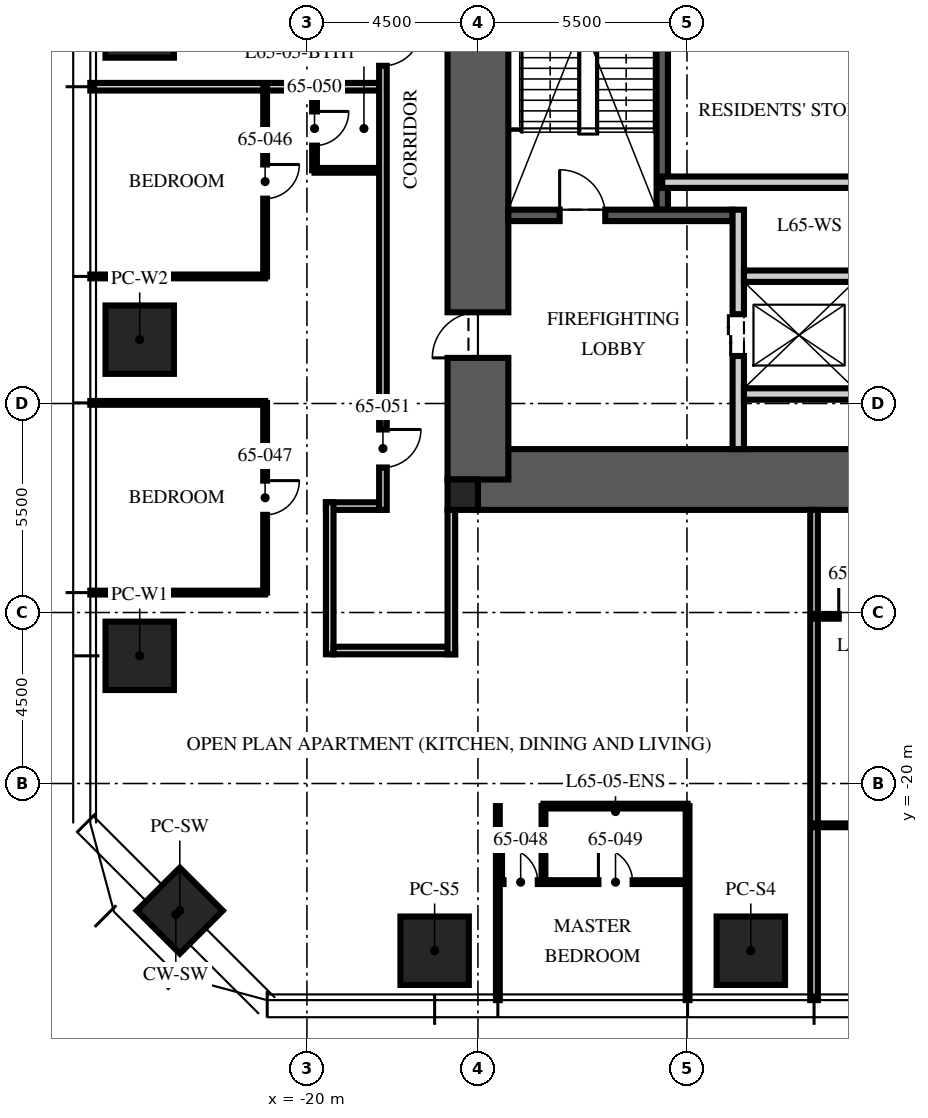
"""IFC4 building model, lengths in metres.
Left out: names, types, materials, properties, quantities, classifications, styles, units other than length and angle.
Written with IfcOpenShell. Run it as: python <this file> out.ifc"""

import sys

from ifc_helpers import new_model, si_unit, direction, frame, frame_2d, origin, origin_2d, place, context, subcontext, project, spatial, rectangle, extrude, element, fill, save


model = new_model("IFC4")
c1 = context("Model", 3, precision=1e-05, world=origin(), true_north=direction((0.0, 1.0)))
c2 = subcontext(c1, "Body", "Model", "MODEL_VIEW")
j1 = project(units=[si_unit("LENGTHUNIT", "METRE"), si_unit("PLANEANGLEUNIT", "RADIAN")], contexts=[c1])
p1 = place(None, origin())
s1 = spatial("IfcSite", under=j1, at=p1, CompositionType="ELEMENT")
p2 = place(p1, origin())
s2 = spatial("IfcBuilding", under=s1, at=p2, CompositionType="ELEMENT")
p3 = place(p2, frame((0.0, 0.0, 259.5)))
s3 = spatial("IfcBuildingStorey", under=s2, at=p3, CompositionType="ELEMENT", Elevation=259.5)
p4 = place(p3, frame((-15.5, -12.0, -0.25), z_axis=(0.0, 0.0, 1.0), x_axis=(1.0, 0.0, 0.0)))
e1 = element("IfcWall", 1, at=p4, inside=s3, PredefinedType="SHEAR", context=c2, shape_type="SweptSolid", body=[
    extrude(rectangle(XDim=31.0, YDim=1.6, at=frame_2d((15.5, 0.0))), origin(), (0.0, 0.0, 1.0), 3.75),
])
p5 = place(p3, frame((-15.5, -12.0, -0.25), z_axis=(0.0, 0.0, 1.0), x_axis=(0.0, 1.0, 0.0)))
e2 = element("IfcWall", 2, at=p5, inside=s3, PredefinedType="SHEAR", context=c2, shape_type="SweptSolid", body=[
    extrude(rectangle(XDim=24.0, YDim=1.6, at=frame_2d((12.0, 0.0))), origin(), (0.0, 0.0, 1.0), 3.75),
])
p6 = place(p5, frame((3.2, 0.0, 0.25)))
e3 = element("IfcOpeningElement", 3, at=p6, cuts=e2, PredefinedType="OPENING", context=c2, shape_type="SweptSolid", body=[
    extrude(rectangle(XDim=1.2, YDim=2.1, at=frame_2d((0.6, 1.05))), frame((0.0, 0.81, 0.0), z_axis=(0.0, -1.0, 0.0), x_axis=(1.0, 0.0, 0.0)), (0.0, 0.0, 1.0), 1.62),
])
p7 = place(p5, frame((19.3, 0.0, 0.25)))
e4 = element("IfcOpeningElement", 4, at=p7, cuts=e2, PredefinedType="OPENING", context=c2, shape_type="SweptSolid", body=[
    extrude(rectangle(XDim=1.8, YDim=2.1, at=frame_2d((0.9, 1.05))), frame((0.0, 0.81, 0.0), z_axis=(0.0, -1.0, 0.0), x_axis=(1.0, 0.0, 0.0)), (0.0, 0.0, 1.0), 1.62),
])
p8 = place(p3, frame((-15.9, -12.4, -0.25), z_axis=(0.0, 0.0, 1.0), x_axis=(1.0, 0.0, 0.0)))
e5 = element("IfcColumn", 5, at=p8, inside=s3, PredefinedType="COLUMN", context=c2, shape_type="SweptSolid", body=[
    extrude(rectangle(XDim=0.8, YDim=0.8, at=origin_2d()), origin(), (0.0, 0.0, 1.0), 3.75),
])
for number, where, z_axis, x_axis in (
    (6, (-8.32, -24.4, 0.0), (0.0, 0.0, 1.0), (1.0, 0.0, 0.0)),
    (7, (-16.64, -24.4, 0.0), (0.0, 0.0, 1.0), (1.0, 0.0, 0.0)),
    (8, (-24.4, -16.64, 0.0), (0.0, 0.0, 1.0), (0.0, 1.0, 0.0)),
    (9, (-24.4, -8.32, 0.0), (0.0, 0.0, 1.0), (0.0, 1.0, 0.0)),
    (10, (-24.4, 0.0, 0.0), (0.0, 0.0, 1.0), (0.0, 1.0, 0.0)),
):
    element("IfcColumn", number, at=place(p3, frame(where, z_axis=z_axis, x_axis=x_axis)), inside=s3, PredefinedType="COLUMN", context=c2, shape_type="SweptSolid", body=[
        extrude(rectangle(XDim=1.8, YDim=1.8, at=origin_2d()), origin(), (0.0, 0.0, 1.0), 3.75),
    ])
p9 = place(p3, frame((-23.346, -23.346, 0.0), z_axis=(0.0, 0.0, 1.0), x_axis=(0.707106781187, -0.707106781187, 0.0)))
e11 = element("IfcColumn", 11, at=p9, inside=s3, PredefinedType="COLUMN", context=c2, shape_type="SweptSolid", body=[
    extrude(rectangle(XDim=1.6, YDim=1.6, at=origin_2d()), origin(), (0.0, 0.0, 1.0), 3.75),
])
p10 = place(p3, frame((-10.65, -4.9, 0.0), z_axis=(0.0, 0.0, 1.0), x_axis=(0.0, 1.0, 0.0)))
e12 = element("IfcWall", 12, at=p10, inside=s3, PredefinedType="SOLIDWALL", context=c2, shape_type="SweptSolid", body=[
    extrude(rectangle(XDim=10.1, YDim=0.3, at=frame_2d((5.05, 0.0))), origin(), (0.0, 0.0, 1.0), 3.5),
])
p11 = place(p3, frame((-14.7, -5.05, 0.0), z_axis=(0.0, 0.0, 1.0), x_axis=(1.0, 0.0, 0.0)))
e13 = element("IfcWall", 13, at=p11, inside=s3, PredefinedType="SOLIDWALL", context=c2, shape_type="SweptSolid", body=[
    extrude(rectangle(XDim=5.9, YDim=0.3, at=frame_2d((2.95, 0.0))), origin(), (0.0, 0.0, 1.0), 3.5),
])
p12 = place(p11, frame((1.35, 0.0, 0.0)))
e14 = element("IfcOpeningElement", 14, at=p12, cuts=e13, PredefinedType="OPENING", context=c2, shape_type="SweptSolid", body=[
    extrude(rectangle(XDim=1.2, YDim=2.1, at=frame_2d((0.6, 1.05))), frame((0.0, 0.16, 0.0), z_axis=(0.0, -1.0, 0.0), x_axis=(1.0, 0.0, 0.0)), (0.0, 0.0, 1.0), 0.32),
])
p13 = place(p3, frame((-8.65, -11.2, 0.0), z_axis=(0.0, 0.0, 1.0), x_axis=(0.0, 1.0, 0.0)))
e15 = element("IfcWall", 15, at=p13, inside=s3, PredefinedType="PARTITIONING", context=c2, shape_type="SweptSolid", body=[
    extrude(rectangle(XDim=6.3, YDim=0.3, at=frame_2d((3.15, 0.0))), origin(), (0.0, 0.0, 1.0), 3.5),
])
p14 = place(p13, frame((2.45, 0.0, 0.0)))
e16 = element("IfcOpeningElement", 16, at=p14, cuts=e15, PredefinedType="OPENING", context=c2, shape_type="SweptSolid", body=[
    extrude(rectangle(XDim=1.1, YDim=2.1, at=frame_2d((0.55, 1.05))), frame((0.0, 0.16, 0.0), z_axis=(0.0, -1.0, 0.0), x_axis=(1.0, 0.0, 0.0)), (0.0, 0.0, 1.0), 0.32),
])
p15 = place(p3, frame((-8.5, -6.65, 0.0), z_axis=(0.0, 0.0, 1.0), x_axis=(1.0, 0.0, 0.0)))
e17 = element("IfcWall", 17, at=p15, inside=s3, PredefinedType="PARTITIONING", context=c2, shape_type="SweptSolid", body=[
    extrude(rectangle(XDim=17.0, YDim=0.3, at=frame_2d((8.5, 0.0))), origin(), (0.0, 0.0, 1.0), 3.5),
])
p16 = place(p15, frame((7.8, 0.0, 0.0)))
e18 = element("IfcOpeningElement", 18, at=p16, cuts=e17, PredefinedType="OPENING", context=c2, shape_type="SweptSolid", body=[
    extrude(rectangle(XDim=1.3, YDim=2.4, at=frame_2d((0.65, 1.2))), frame((0.0, 0.16, 0.0), z_axis=(0.0, -1.0, 0.0), x_axis=(1.0, 0.0, 0.0)), (0.0, 0.0, 1.0), 0.32),
])
p17 = place(p15, frame((5.65, 0.0, 0.0)))
e19 = element("IfcOpeningElement", 19, at=p17, cuts=e17, PredefinedType="OPENING", context=c2, shape_type="SweptSolid", body=[
    extrude(rectangle(XDim=0.9, YDim=2.1, at=frame_2d((0.45, 1.05))), frame((0.0, 0.16, 0.0), z_axis=(0.0, -1.0, 0.0), x_axis=(1.0, 0.0, 0.0)), (0.0, 0.0, 1.0), 0.32),
])
p18 = place(p15, frame((10.4, 0.0, 0.0)))
e20 = element("IfcOpeningElement", 20, at=p18, cuts=e17, PredefinedType="OPENING", context=c2, shape_type="SweptSolid", body=[
    extrude(rectangle(XDim=0.9, YDim=2.1, at=frame_2d((0.45, 1.05))), frame((0.0, 0.16, 0.0), z_axis=(0.0, -1.0, 0.0), x_axis=(1.0, 0.0, 0.0)), (0.0, 0.0, 1.0), 0.32),
])
p19 = place(p3, frame((-8.5, -9.75, 0.0), z_axis=(0.0, 0.0, 1.0), x_axis=(1.0, 0.0, 0.0)))
e21 = element("IfcWall", 21, at=p19, inside=s3, PredefinedType="PARTITIONING", context=c2, shape_type="SweptSolid", body=[
    extrude(rectangle(XDim=2.9, YDim=0.3, at=frame_2d((1.45, 0.0))), origin(), (0.0, 0.0, 1.0), 3.5),
])
p20 = place(p3, frame((-10.65, -4.177, 0.0), z_axis=(0.0, 0.0, 1.0), x_axis=(1.0, 0.0, 0.0)))
e22 = element("IfcWall", 22, at=p20, inside=s3, PredefinedType="PARTITIONING", context=c2, shape_type="SweptSolid", body=[
    extrude(rectangle(XDim=6.45, YDim=0.3, at=frame_2d((3.225, 0.0))), origin(), (0.0, 0.0, 1.0), 3.5),
])
p21 = place(p3, frame((-18.1, -12.7, 0.0), z_axis=(0.0, 0.0, 1.0), x_axis=(-1.0, 0.0, 0.0)))
e23 = element("IfcWall", 23, at=p21, inside=s3, PredefinedType="PARTITIONING", context=c2, shape_type="SweptSolid", body=[
    extrude(rectangle(XDim=1.4, YDim=0.2, at=frame_2d((0.7, 0.0))), origin(), (0.0, 0.0, 1.0), 2.81),
])
p22 = place(p3, frame((-19.4, -12.6, 0.0), z_axis=(0.0, 0.0, 1.0), x_axis=(0.0, -1.0, 0.0)))
e24 = element("IfcWall", 24, at=p22, inside=s3, PredefinedType="PARTITIONING", context=c2, shape_type="SweptSolid", body=[
    extrude(rectangle(XDim=4.0, YDim=0.2, at=frame_2d((2.0, 0.0))), origin(), (0.0, 0.0, 1.0), 2.6),
])
p23 = place(p3, frame((-19.3, -16.5, 0.0), z_axis=(0.0, 0.0, 1.0), x_axis=(1.0, 0.0, 0.0)))
e25 = element("IfcWall", 25, at=p23, inside=s3, PredefinedType="PARTITIONING", context=c2, shape_type="SweptSolid", body=[
    extrude(rectangle(XDim=3.2, YDim=0.2, at=frame_2d((1.6, 0.0))), origin(), (0.0, 0.0, 1.0), 2.3),
])
p24 = place(p3, frame((-16.2, -16.6, 0.0), z_axis=(0.0, 0.0, 1.0), x_axis=(0.0, 1.0, 0.0)))
e26 = element("IfcWall", 26, at=p24, inside=s3, PredefinedType="PARTITIONING", context=c2, shape_type="SweptSolid", body=[
    extrude(rectangle(XDim=3.8, YDim=0.2, at=frame_2d((1.9, 0.0))), origin(), (0.0, 0.0, 1.0), 2.3),
])
p25 = place(p3, frame((-18.1, -1.664, 0.0), z_axis=(0.0, 0.0, 1.0), x_axis=(-1.0, 0.0, 0.0)))
e27 = element("IfcWall", 27, at=p25, inside=s3, PredefinedType="PARTITIONING", context=c2, shape_type="SweptSolid", body=[
    extrude(rectangle(XDim=7.6, YDim=0.2, at=frame_2d((3.8, 0.0))), origin(), (0.0, 0.0, 1.0), 2.91),
])
for number, where, z_axis, x_axis in (
    (28, (-21.1, -6.656, 0.0), (0.0, 0.0, 1.0), (-1.0, 0.0, 0.0)),
    (29, (-21.1, -9.984, 0.0), (0.0, 0.0, 1.0), (-1.0, 0.0, 0.0)),
    (30, (-21.1, -14.976, 0.0), (0.0, 0.0, 1.0), (-1.0, 0.0, 0.0)),
):
    element("IfcWall", number, at=place(p3, frame(where, z_axis=z_axis, x_axis=x_axis)), inside=s3, PredefinedType="PARTITIONING", context=c2, shape_type="SweptSolid", body=[
        extrude(rectangle(XDim=4.6, YDim=0.1, at=frame_2d((2.3, 0.0))), origin(), (0.0, 0.0, 1.0), 2.91),
    ])
for number, where, z_axis, x_axis in (
    (31, (-14.976, -20.595, 0.0), (0.0, 0.0, 1.0), (0.0, -1.0, 0.0)),
    (32, (-9.984, -20.595, 0.0), (0.0, 0.0, 1.0), (0.0, -1.0, 0.0)),
):
    element("IfcWall", number, at=place(p3, frame(where, z_axis=z_axis, x_axis=x_axis)), inside=s3, PredefinedType="PARTITIONING", context=c2, shape_type="SweptSolid", body=[
        extrude(rectangle(XDim=5.105, YDim=0.1, at=frame_2d((2.552, 0.0))), origin(), (0.0, 0.0, 1.0), 2.91),
    ])
p26 = place(p3, frame((-6.656, -12.8, 0.0), z_axis=(0.0, 0.0, 1.0), x_axis=(0.0, -1.0, 0.0)))
e33 = element("IfcWall", 33, at=p26, inside=s3, PredefinedType="PARTITIONING", context=c2, shape_type="SweptSolid", body=[
    extrude(rectangle(XDim=12.9, YDim=0.2, at=frame_2d((6.45, 0.0))), origin(), (0.0, 0.0, 1.0), 2.91),
])
p27 = place(p3, frame((-21.1, -1.664, 0.0), z_axis=(0.0, 0.0, 1.0), x_axis=(0.0, -1.0, 0.0)))
e34 = element("IfcWall", 34, at=p27, inside=s3, PredefinedType="PARTITIONING", context=c2, shape_type="SweptSolid", body=[
    extrude(rectangle(XDim=4.992, YDim=0.1, at=frame_2d((2.496, 0.0))), origin(), (0.0, 0.0, 1.0), 2.81),
])
p28 = place(p27, frame((2.046, 0.0, 0.0)))
e35 = element("IfcOpeningElement", 35, at=p28, cuts=e34, PredefinedType="OPENING", context=c2, shape_type="SweptSolid", body=[
    extrude(rectangle(XDim=0.9, YDim=2.1, at=frame_2d((0.45, 1.05))), frame((0.0, 0.06, 0.0), z_axis=(0.0, -1.0, 0.0), x_axis=(1.0, 0.0, 0.0)), (0.0, 0.0, 1.0), 0.12),
])
p29 = place(p3, frame((-21.1, -9.984, 0.0), z_axis=(0.0, 0.0, 1.0), x_axis=(0.0, -1.0, 0.0)))
e36 = element("IfcWall", 36, at=p29, inside=s3, PredefinedType="PARTITIONING", context=c2, shape_type="SweptSolid", body=[
    extrude(rectangle(XDim=4.992, YDim=0.1, at=frame_2d((2.496, 0.0))), origin(), (0.0, 0.0, 1.0), 2.81),
])
p30 = place(p29, frame((2.046, 0.0, 0.0)))
e37 = element("IfcOpeningElement", 37, at=p30, cuts=e36, PredefinedType="OPENING", context=c2, shape_type="SweptSolid", body=[
    extrude(rectangle(XDim=0.9, YDim=2.1, at=frame_2d((0.45, 1.05))), frame((0.0, 0.06, 0.0), z_axis=(0.0, -1.0, 0.0), x_axis=(1.0, 0.0, 0.0)), (0.0, 0.0, 1.0), 0.12),
])
p31 = place(p3, frame((-14.976, -22.595, 0.0), z_axis=(0.0, 0.0, 1.0), x_axis=(1.0, 0.0, 0.0)))
e38 = element("IfcWall", 38, at=p31, inside=s3, PredefinedType="PARTITIONING", context=c2, shape_type="SweptSolid", body=[
    extrude(rectangle(XDim=4.992, YDim=0.1, at=frame_2d((2.496, 0.0))), origin(), (0.0, 0.0, 1.0), 2.81),
])
p32 = place(p31, frame((0.15, 0.0, 0.0)))
e39 = element("IfcOpeningElement", 39, at=p32, cuts=e38, PredefinedType="OPENING", context=c2, shape_type="SweptSolid", body=[
    extrude(rectangle(XDim=0.9, YDim=2.1, at=frame_2d((0.45, 1.05))), frame((0.0, 0.06, 0.0), z_axis=(0.0, -1.0, 0.0), x_axis=(1.0, 0.0, 0.0)), (0.0, 0.0, 1.0), 0.12),
])
p33 = place(p31, frame((2.646, 0.0, 0.0)))
e40 = element("IfcOpeningElement", 40, at=p33, cuts=e38, PredefinedType="OPENING", context=c2, shape_type="SweptSolid", body=[
    extrude(rectangle(XDim=0.9, YDim=2.1, at=frame_2d((0.45, 1.05))), frame((0.0, 0.06, 0.0), z_axis=(0.0, -1.0, 0.0), x_axis=(1.0, 0.0, 0.0)), (0.0, 0.0, 1.0), 0.12),
])
p34 = place(p3, frame((-13.776, -20.595, 0.0), z_axis=(0.0, 0.0, 1.0), x_axis=(0.0, -1.0, 0.0)))
e41 = element("IfcWall", 41, at=p34, inside=s3, PredefinedType="PARTITIONING", context=c2, shape_type="SweptSolid", body=[
    extrude(rectangle(XDim=2.0, YDim=0.1, at=frame_2d((1.0, 0.0))), origin(), (0.0, 0.0, 1.0), 3.5),
])
p35 = place(p3, frame((-13.776, -20.595, 0.0), z_axis=(0.0, 0.0, 1.0), x_axis=(1.0, 0.0, 0.0)))
e42 = element("IfcWall", 42, at=p35, inside=s3, PredefinedType="PARTITIONING", context=c2, shape_type="SweptSolid", body=[
    extrude(rectangle(XDim=3.792, YDim=0.125, at=frame_2d((1.896, 0.0))), origin(), (0.0, 0.0, 1.0), 2.81),
])
p36 = place(p3, frame((-19.8, -1.664, 0.0), z_axis=(0.0, 0.0, 1.0), x_axis=(0.0, -1.0, 0.0)))
e43 = element("IfcWall", 43, at=p36, inside=s3, PredefinedType="PARTITIONING", context=c2, shape_type="SweptSolid", body=[
    extrude(rectangle(XDim=2.2, YDim=0.125, at=frame_2d((1.1, 0.0))), origin(), (0.0, 0.0, 1.0), 3.5),
])
p37 = place(p36, frame((0.65, 0.0, 0.0)))
e44 = element("IfcOpeningElement", 44, at=p37, cuts=e43, PredefinedType="OPENING", context=c2, shape_type="SweptSolid", body=[
    extrude(rectangle(XDim=0.9, YDim=2.1, at=frame_2d((0.45, 1.05))), frame((0.0, 0.073, 0.0), z_axis=(0.0, -1.0, 0.0), x_axis=(1.0, 0.0, 0.0)), (0.0, 0.0, 1.0), 0.145),
])
p38 = place(p3, frame((-18.1, -3.864, 0.0), z_axis=(0.0, 0.0, 1.0), x_axis=(-1.0, 0.0, 0.0)))
e45 = element("IfcWall", 45, at=p38, inside=s3, PredefinedType="PARTITIONING", context=c2, shape_type="SweptSolid", body=[
    extrude(rectangle(XDim=1.7, YDim=0.125, at=frame_2d((0.85, 0.0))), origin(), (0.0, 0.0, 1.0), 3.5),
])
p39 = place(p3, frame((-6.656, -21.1, 0.0), z_axis=(0.0, 0.0, 1.0), x_axis=(1.0, 0.0, 0.0)))
e46 = element("IfcWall", 46, at=p39, inside=s3, PredefinedType="PARTITIONING", context=c2, shape_type="SweptSolid", body=[
    extrude(rectangle(XDim=4.992, YDim=0.1, at=frame_2d((2.496, 0.0))), origin(), (0.0, 0.0, 1.0), 2.81),
])
p40 = place(p39, frame((2.046, 0.0, 0.0)))
e47 = element("IfcOpeningElement", 47, at=p40, cuts=e46, PredefinedType="OPENING", context=c2, shape_type="SweptSolid", body=[
    extrude(rectangle(XDim=0.9, YDim=2.1, at=frame_2d((0.45, 1.05))), frame((0.0, 0.06, 0.0), z_axis=(0.0, -1.0, 0.0), x_axis=(1.0, 0.0, 0.0)), (0.0, 0.0, 1.0), 0.12),
])
p41 = place(p3, frame((-6.656, -15.6, 0.0), z_axis=(0.0, 0.0, 1.0), x_axis=(1.0, 0.0, 0.0)))
e48 = element("IfcWall", 48, at=p41, inside=s3, PredefinedType="PARTITIONING", context=c2, shape_type="SweptSolid", body=[
    extrude(rectangle(XDim=6.2, YDim=0.125, at=frame_2d((3.1, 0.0))), origin(), (0.0, 0.0, 1.0), 2.81),
])
p42 = place(p41, frame((0.65, 0.0, 0.0)))
e49 = element("IfcOpeningElement", 49, at=p42, cuts=e48, PredefinedType="OPENING", context=c2, shape_type="SweptSolid", body=[
    extrude(rectangle(XDim=0.9, YDim=2.1, at=frame_2d((0.45, 1.05))), frame((0.0, 0.073, 0.0), z_axis=(0.0, -1.0, 0.0), x_axis=(1.0, 0.0, 0.0)), (0.0, 0.0, 1.0), 0.145),
])
p43 = place(p41, frame((2.85, 0.0, 0.0)))
e50 = element("IfcOpeningElement", 50, at=p43, cuts=e48, PredefinedType="OPENING", context=c2, shape_type="SweptSolid", body=[
    extrude(rectangle(XDim=0.9, YDim=2.1, at=frame_2d((0.45, 1.05))), frame((0.0, 0.073, 0.0), z_axis=(0.0, -1.0, 0.0), x_axis=(1.0, 0.0, 0.0)), (0.0, 0.0, 1.0), 0.145),
])
p44 = place(p41, frame((4.85, 0.0, 0.0)))
e51 = element("IfcOpeningElement", 51, at=p44, cuts=e48, PredefinedType="OPENING", context=c2, shape_type="SweptSolid", body=[
    extrude(rectangle(XDim=0.9, YDim=2.1, at=frame_2d((0.45, 1.05))), frame((0.0, 0.073, 0.0), z_axis=(0.0, -1.0, 0.0), x_axis=(1.0, 0.0, 0.0)), (0.0, 0.0, 1.0), 0.145),
])
p45 = place(p3, frame((-18.0, 13.0, 0.0), z_axis=(0.0, 0.0, 1.0), x_axis=(0.0, -1.0, 0.0)))
e52 = element("IfcWall", 52, at=p45, inside=s3, PredefinedType="PARTITIONING", context=c2, shape_type="SweptSolid", body=[
    extrude(rectangle(XDim=25.8, YDim=0.2, at=frame_2d((12.9, 0.0))), origin(), (0.0, 0.0, 1.0), 2.6),
])
p46 = place(p45, frame((4.6, 0.0, 0.0)))
e53 = element("IfcOpeningElement", 53, at=p46, cuts=e52, PredefinedType="OPENING", context=c2, shape_type="SweptSolid", body=[
    extrude(rectangle(XDim=1.0, YDim=2.2, at=frame_2d((0.5, 1.1))), frame((0.0, 0.11, 0.0), z_axis=(0.0, -1.0, 0.0), x_axis=(1.0, 0.0, 0.0)), (0.0, 0.0, 1.0), 0.22),
])
p47 = place(p45, frame((13.114, 0.0, 0.0)))
e54 = element("IfcOpeningElement", 54, at=p47, cuts=e52, PredefinedType="OPENING", context=c2, shape_type="SweptSolid", body=[
    extrude(rectangle(XDim=1.0, YDim=2.2, at=frame_2d((0.5, 1.1))), frame((0.0, 0.11, 0.0), z_axis=(0.0, -1.0, 0.0), x_axis=(1.0, 0.0, 0.0)), (0.0, 0.0, 1.0), 0.22),
])
p48 = place(p45, frame((23.684, 0.0, 0.0)))
e55 = element("IfcOpeningElement", 55, at=p48, cuts=e52, PredefinedType="OPENING", context=c2, shape_type="SweptSolid", body=[
    extrude(rectangle(XDim=1.0, YDim=2.2, at=frame_2d((0.5, 1.1))), frame((0.0, 0.11, 0.0), z_axis=(0.0, -1.0, 0.0), x_axis=(1.0, 0.0, 0.0)), (0.0, 0.0, 1.0), 0.22),
])
p49 = place(p12, origin())
e56 = element("IfcDoor", 56, at=p49, inside=s3, OperationType="SINGLE_SWING_LEFT", PredefinedType="DOOR", context=c2, shape_type="SweptSolid", body=[
    extrude(rectangle(XDim=1.2, YDim=2.1, at=frame_2d((0.6, 1.05))), frame((0.0, 0.025, 0.0), z_axis=(0.0, -1.0, 0.0), x_axis=(1.0, 0.0, 0.0)), (0.0, 0.0, 1.0), 0.05),
])
fill(e14, e56)
p50 = place(p6, origin())
e57 = element("IfcDoor", 57, at=p50, inside=s3, OperationType="SINGLE_SWING_LEFT", PredefinedType="DOOR", context=c2, shape_type="SweptSolid", body=[
    extrude(rectangle(XDim=1.2, YDim=2.1, at=frame_2d((0.6, 1.05))), frame((0.0, 0.025, 0.0), z_axis=(0.0, -1.0, 0.0), x_axis=(1.0, 0.0, 0.0)), (0.0, 0.0, 1.0), 0.05),
])
fill(e3, e57)
p51 = place(p14, origin())
e58 = element("IfcDoor", 58, at=p51, inside=s3, OperationType="DOUBLE_DOOR_SLIDING", PredefinedType="DOOR", context=c2, shape_type="SweptSolid", body=[
    extrude(rectangle(XDim=1.1, YDim=2.1, at=frame_2d((0.55, 1.05))), frame((0.0, 0.025, 0.0), z_axis=(0.0, -1.0, 0.0), x_axis=(1.0, 0.0, 0.0)), (0.0, 0.0, 1.0), 0.05),
])
fill(e16, e58)
p52 = place(p47, origin())
e59 = element("IfcDoor", 59, at=p52, inside=s3, OperationType="SINGLE_SWING_LEFT", PredefinedType="DOOR", context=c2, shape_type="SweptSolid", body=[
    extrude(rectangle(XDim=1.0, YDim=2.2, at=frame_2d((0.5, 1.1))), frame((0.0, 0.025, 0.0), z_axis=(0.0, -1.0, 0.0), x_axis=(1.0, 0.0, 0.0)), (0.0, 0.0, 1.0), 0.05),
])
fill(e54, e59)
p53 = place(p28, origin())
e60 = element("IfcDoor", 60, at=p53, inside=s3, OperationType="SINGLE_SWING_LEFT", PredefinedType="DOOR", context=c2, shape_type="SweptSolid", body=[
    extrude(rectangle(XDim=0.9, YDim=2.1, at=frame_2d((0.45, 1.05))), frame((0.0, 0.025, 0.0), z_axis=(0.0, -1.0, 0.0), x_axis=(1.0, 0.0, 0.0)), (0.0, 0.0, 1.0), 0.05),
])
fill(e35, e60)
p54 = place(p30, origin())
e61 = element("IfcDoor", 61, at=p54, inside=s3, OperationType="SINGLE_SWING_LEFT", PredefinedType="DOOR", context=c2, shape_type="SweptSolid", body=[
    extrude(rectangle(XDim=0.9, YDim=2.1, at=frame_2d((0.45, 1.05))), frame((0.0, 0.025, 0.0), z_axis=(0.0, -1.0, 0.0), x_axis=(1.0, 0.0, 0.0)), (0.0, 0.0, 1.0), 0.05),
])
fill(e37, e61)
p55 = place(p32, origin())
e62 = element("IfcDoor", 62, at=p55, inside=s3, OperationType="SINGLE_SWING_LEFT", PredefinedType="DOOR", context=c2, shape_type="SweptSolid", body=[
    extrude(rectangle(XDim=0.9, YDim=2.1, at=frame_2d((0.45, 1.05))), frame((0.0, 0.025, 0.0), z_axis=(0.0, -1.0, 0.0), x_axis=(1.0, 0.0, 0.0)), (0.0, 0.0, 1.0), 0.05),
])
fill(e39, e62)
p56 = place(p33, origin())
e63 = element("IfcDoor", 63, at=p56, inside=s3, OperationType="SINGLE_SWING_LEFT", PredefinedType="DOOR", context=c2, shape_type="SweptSolid", body=[
    extrude(rectangle(XDim=0.9, YDim=2.1, at=frame_2d((0.45, 1.05))), frame((0.0, 0.025, 0.0), z_axis=(0.0, -1.0, 0.0), x_axis=(1.0, 0.0, 0.0)), (0.0, 0.0, 1.0), 0.05),
])
fill(e40, e63)
p57 = place(p37, origin())
e64 = element("IfcDoor", 64, at=p57, inside=s3, OperationType="SINGLE_SWING_LEFT", PredefinedType="DOOR", context=c2, shape_type="SweptSolid", body=[
    extrude(rectangle(XDim=0.9, YDim=2.1, at=frame_2d((0.45, 1.05))), frame((0.0, 0.025, 0.0), z_axis=(0.0, -1.0, 0.0), x_axis=(1.0, 0.0, 0.0)), (0.0, 0.0, 1.0), 0.05),
])
fill(e44, e64)
p58 = place(p48, origin())
e65 = element("IfcDoor", 65, at=p58, inside=s3, OperationType="SINGLE_SWING_LEFT", PredefinedType="DOOR", context=c2, shape_type="SweptSolid", body=[
    extrude(rectangle(XDim=1.0, YDim=2.2, at=frame_2d((0.5, 1.1))), frame((0.0, 0.025, 0.0), z_axis=(0.0, -1.0, 0.0), x_axis=(1.0, 0.0, 0.0)), (0.0, 0.0, 1.0), 0.05),
])
fill(e55, e65)
p59 = place(p42, origin())
e66 = element("IfcDoor", 66, at=p59, inside=s3, OperationType="SINGLE_SWING_LEFT", PredefinedType="DOOR", context=c2, shape_type="SweptSolid", body=[
    extrude(rectangle(XDim=0.9, YDim=2.1, at=frame_2d((0.45, 1.05))), frame((0.0, 0.025, 0.0), z_axis=(0.0, -1.0, 0.0), x_axis=(1.0, 0.0, 0.0)), (0.0, 0.0, 1.0), 0.05),
])
fill(e49, e66)
save(model, sys.argv[1])
